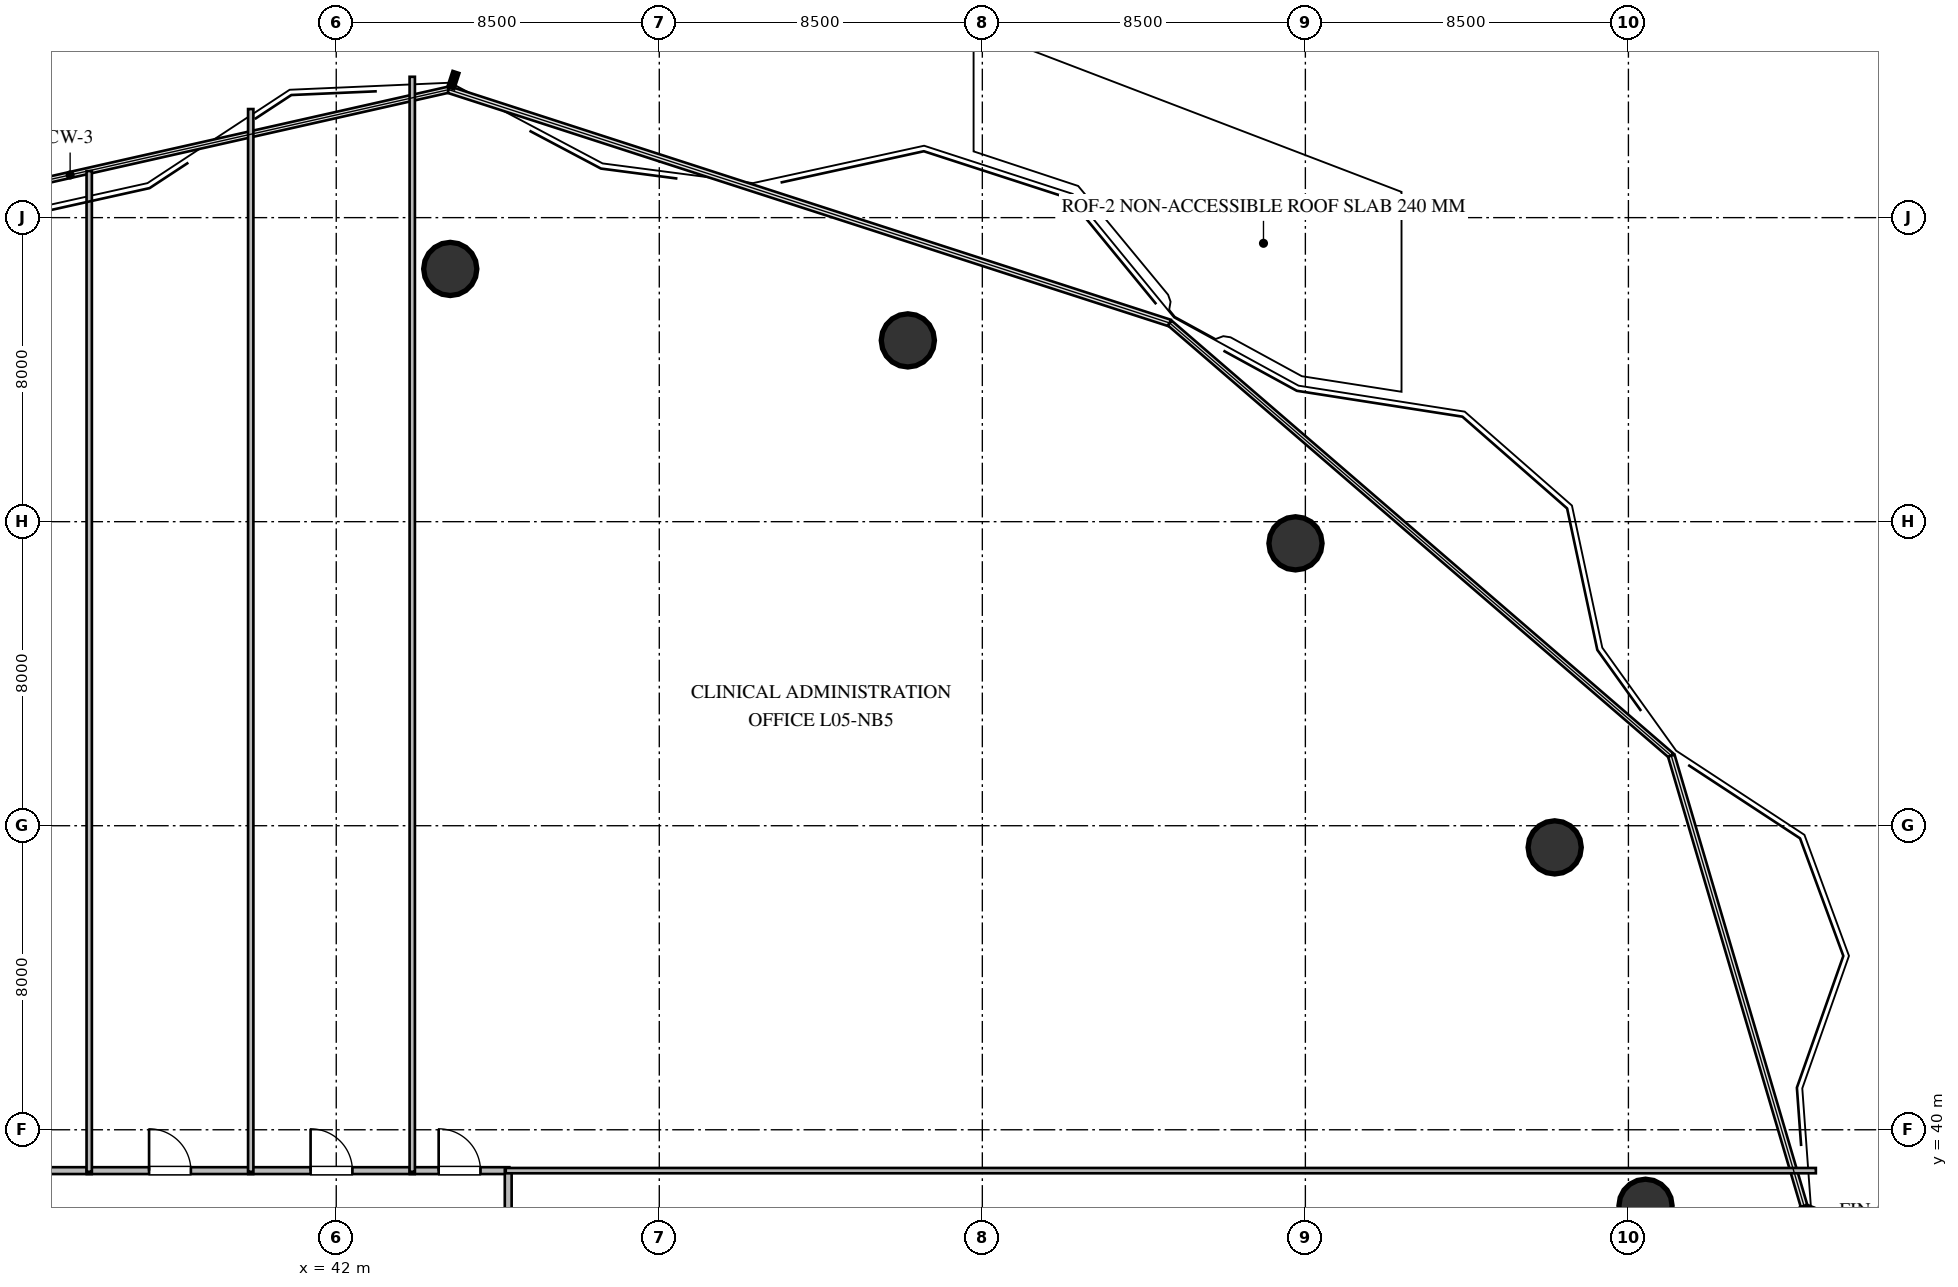
"""IFC4 building model, lengths in metres.
Left out: names, types, materials, properties, quantities, classifications, styles, units other than length and angle.
Written with IfcOpenShell. Run it as: python <this file> out.ifc"""

import sys

from ifc_helpers import new_model, si_unit, direction, frame, frame_2d, origin, origin_2d, place, context, subcontext, project, spatial, rectangle, circle, extrude, element, fill, save


model = new_model("IFC4")
c1 = context("Model", 3, precision=1e-05, world=origin(), true_north=direction((0.0, 1.0)))
c2 = subcontext(c1, "Body", "Model", "MODEL_VIEW")
j1 = project(units=[si_unit("LENGTHUNIT", "METRE"), si_unit("PLANEANGLEUNIT", "RADIAN")], contexts=[c1])
p1 = place(None, origin())
s1 = spatial("IfcSite", under=j1, at=p1, CompositionType="ELEMENT")
p2 = place(p1, origin())
s2 = spatial("IfcBuilding", under=s1, at=p2, CompositionType="ELEMENT")
p3 = place(p2, frame((0.0, 0.0, 24.0)))
s3 = spatial("IfcBuildingStorey", under=s2, at=p3, CompositionType="ELEMENT", Elevation=24.0)
for number, where, z_axis, x_axis in (
    (1, (76.45, 38.0, 0.0), (0.0, 0.0, 1.0), (1.0, 0.0, 0.0)),
    (2, (74.06, 47.43, 0.0), (0.0, 0.0, 1.0), (1.0, 0.0, 0.0)),
    (3, (67.24, 55.43, 0.0), (0.0, 0.0, 1.0), (1.0, 0.0, 0.0)),
    (4, (57.04, 60.77, 0.0), (0.0, 0.0, 1.0), (1.0, 0.0, 0.0)),
    (5, (45.0, 62.65, 0.0), (0.0, 0.0, 1.0), (1.0, 0.0, 0.0)),
):
    element("IfcColumn", number, at=place(p3, frame(where, z_axis=z_axis, x_axis=x_axis)), inside=s3, PredefinedType="COLUMN", context=c2, shape_type="SweptSolid", body=[
        extrude(circle(Radius=0.7, at=origin_2d()), origin(), (0.0, 0.0, 1.0), 3.6),
    ])
p4 = place(p3, frame((31.435, 38.925, 0.0), z_axis=(0.0, 0.0, 1.0), x_axis=(1.0, 0.0, 0.0)))
e6 = element("IfcWall", 6, at=p4, inside=s3, PredefinedType="PARTITIONING", context=c2, shape_type="SweptSolid", body=[
    extrude(rectangle(XDim=4.13, YDim=0.18, at=frame_2d((2.065, 0.0))), origin(), (0.0, 0.0, 1.0), 3.36),
])
p5 = place(p4, frame((1.515, 0.0, 0.0)))
e7 = element("IfcOpeningElement", 7, at=p5, cuts=e6, PredefinedType="OPENING", context=c2, shape_type="SweptSolid", body=[
    extrude(rectangle(XDim=1.1, YDim=2.1, at=frame_2d((0.55, 1.05))), frame((0.0, 0.1, 0.0), z_axis=(0.0, -1.0, 0.0), x_axis=(1.0, 0.0, 0.0)), (0.0, 0.0, 1.0), 0.2),
])
p6 = place(p3, frame((35.435, 38.925, 0.0), z_axis=(0.0, 0.0, 1.0), x_axis=(1.0, 0.0, 0.0)))
e8 = element("IfcWall", 8, at=p6, inside=s3, PredefinedType="PARTITIONING", context=c2, shape_type="SweptSolid", body=[
    extrude(rectangle(XDim=4.38, YDim=0.18, at=frame_2d((2.19, 0.0))), origin(), (0.0, 0.0, 1.0), 3.36),
])
p7 = place(p6, frame((1.64, 0.0, 0.0)))
e9 = element("IfcOpeningElement", 9, at=p7, cuts=e8, PredefinedType="OPENING", context=c2, shape_type="SweptSolid", body=[
    extrude(rectangle(XDim=1.1, YDim=2.1, at=frame_2d((0.55, 1.05))), frame((0.0, 0.1, 0.0), z_axis=(0.0, -1.0, 0.0), x_axis=(1.0, 0.0, 0.0)), (0.0, 0.0, 1.0), 0.2),
])
p8 = place(p3, frame((39.685, 38.925, 0.0), z_axis=(0.0, 0.0, 1.0), x_axis=(1.0, 0.0, 0.0)))
e10 = element("IfcWall", 10, at=p8, inside=s3, PredefinedType="PARTITIONING", context=c2, shape_type="SweptSolid", body=[
    extrude(rectangle(XDim=4.38, YDim=0.18, at=frame_2d((2.19, 0.0))), origin(), (0.0, 0.0, 1.0), 3.36),
])
p9 = place(p8, frame((1.64, 0.0, 0.0)))
e11 = element("IfcOpeningElement", 11, at=p9, cuts=e10, PredefinedType="OPENING", context=c2, shape_type="SweptSolid", body=[
    extrude(rectangle(XDim=1.1, YDim=2.1, at=frame_2d((0.55, 1.05))), frame((0.0, 0.1, 0.0), z_axis=(0.0, -1.0, 0.0), x_axis=(1.0, 0.0, 0.0)), (0.0, 0.0, 1.0), 0.2),
])
p10 = place(p3, frame((43.935, 38.925, 0.0), z_axis=(0.0, 0.0, 1.0), x_axis=(1.0, 0.0, 0.0)))
e12 = element("IfcWall", 12, at=p10, inside=s3, PredefinedType="PARTITIONING", context=c2, shape_type="SweptSolid", body=[
    extrude(rectangle(XDim=2.62, YDim=0.18, at=frame_2d((1.31, 0.0))), origin(), (0.0, 0.0, 1.0), 3.36),
])
p11 = place(p10, frame((0.76, 0.0, 0.0)))
e13 = element("IfcOpeningElement", 13, at=p11, cuts=e12, PredefinedType="OPENING", context=c2, shape_type="SweptSolid", body=[
    extrude(rectangle(XDim=1.1, YDim=2.1, at=frame_2d((0.55, 1.05))), frame((0.0, 0.1, 0.0), z_axis=(0.0, -1.0, 0.0), x_axis=(1.0, 0.0, 0.0)), (0.0, 0.0, 1.0), 0.2),
])
p12 = place(p3, frame((46.525, 38.955, 0.0), z_axis=(0.0, 0.0, 1.0), x_axis=(0.0, -1.0, 0.0)))
e14 = element("IfcWall", 14, at=p12, inside=s3, PredefinedType="PARTITIONING", context=c2, shape_type="SweptSolid", body=[
    extrude(rectangle(XDim=4.06, YDim=0.18, at=frame_2d((2.03, 0.0))), origin(), (0.0, 0.0, 1.0), 3.36),
])
p13 = place(p12, frame((1.48, 0.0, 0.0)))
e15 = element("IfcOpeningElement", 15, at=p13, cuts=e14, PredefinedType="OPENING", context=c2, shape_type="SweptSolid", body=[
    extrude(rectangle(XDim=1.1, YDim=2.1, at=frame_2d((0.55, 1.05))), frame((0.0, 0.1, 0.0), z_axis=(0.0, -1.0, 0.0), x_axis=(1.0, 0.0, 0.0)), (0.0, 0.0, 1.0), 0.2),
])
p14 = place(p3, frame((35.5, 65.226, 0.0), z_axis=(0.0, 0.0, 1.0), x_axis=(0.0, -1.0, 0.0)))
e16 = element("IfcWall", 16, at=p14, inside=s3, PredefinedType="PARTITIONING", context=c2, shape_type="SweptSolid", body=[
    extrude(rectangle(XDim=26.331, YDim=0.14, at=frame_2d((13.165, 0.0))), origin(), (0.0, 0.0, 1.0), 3.36),
])
p15 = place(p3, frame((39.75, 66.857, 0.0), z_axis=(0.0, 0.0, 1.0), x_axis=(0.0, -1.0, 0.0)))
e17 = element("IfcWall", 17, at=p15, inside=s3, PredefinedType="PARTITIONING", context=c2, shape_type="SweptSolid", body=[
    extrude(rectangle(XDim=27.962, YDim=0.14, at=frame_2d((13.981, 0.0))), origin(), (0.0, 0.0, 1.0), 3.36),
])
p16 = place(p3, frame((44.0, 67.706, 0.0), z_axis=(0.0, 0.0, 1.0), x_axis=(0.0, -1.0, 0.0)))
e18 = element("IfcWall", 18, at=p16, inside=s3, PredefinedType="PARTITIONING", context=c2, shape_type="SweptSolid", body=[
    extrude(rectangle(XDim=28.811, YDim=0.14, at=frame_2d((14.406, 0.0))), origin(), (0.0, 0.0, 1.0), 2.89),
])
p17 = place(p3, frame((80.932, 38.925, 0.0), z_axis=(0.0, 0.0, 1.0), x_axis=(-1.0, 0.0, 0.0)))
e19 = element("IfcWall", 19, at=p17, inside=s3, PredefinedType="PARTITIONING", context=c2, shape_type="SweptSolid", body=[
    extrude(rectangle(XDim=34.472, YDim=0.14, at=frame_2d((17.236, 0.0))), origin(), (0.0, 0.0, 1.0), 3.36),
])
p18 = place(p7, origin())
e20 = element("IfcDoor", 20, at=p18, inside=s3, OperationType="SINGLE_SWING_LEFT", PredefinedType="DOOR", context=c2, shape_type="SweptSolid", body=[
    extrude(rectangle(XDim=1.1, YDim=2.1, at=frame_2d((0.55, 1.05))), frame((0.0, 0.025, 0.0), z_axis=(0.0, -1.0, 0.0), x_axis=(1.0, 0.0, 0.0)), (0.0, 0.0, 1.0), 0.05),
])
fill(e9, e20)
p19 = place(p9, origin())
e21 = element("IfcDoor", 21, at=p19, inside=s3, OperationType="SINGLE_SWING_LEFT", PredefinedType="DOOR", context=c2, shape_type="SweptSolid", body=[
    extrude(rectangle(XDim=1.1, YDim=2.1, at=frame_2d((0.55, 1.05))), frame((0.0, 0.025, 0.0), z_axis=(0.0, -1.0, 0.0), x_axis=(1.0, 0.0, 0.0)), (0.0, 0.0, 1.0), 0.05),
])
fill(e11, e21)
p20 = place(p11, origin())
e22 = element("IfcDoor", 22, at=p20, inside=s3, OperationType="SINGLE_SWING_LEFT", PredefinedType="DOOR", context=c2, shape_type="SweptSolid", body=[
    extrude(rectangle(XDim=1.1, YDim=2.1, at=frame_2d((0.55, 1.05))), frame((0.0, 0.025, 0.0), z_axis=(0.0, -1.0, 0.0), x_axis=(1.0, 0.0, 0.0)), (0.0, 0.0, 1.0), 0.05),
])
fill(e13, e22)
save(model, sys.argv[1])
